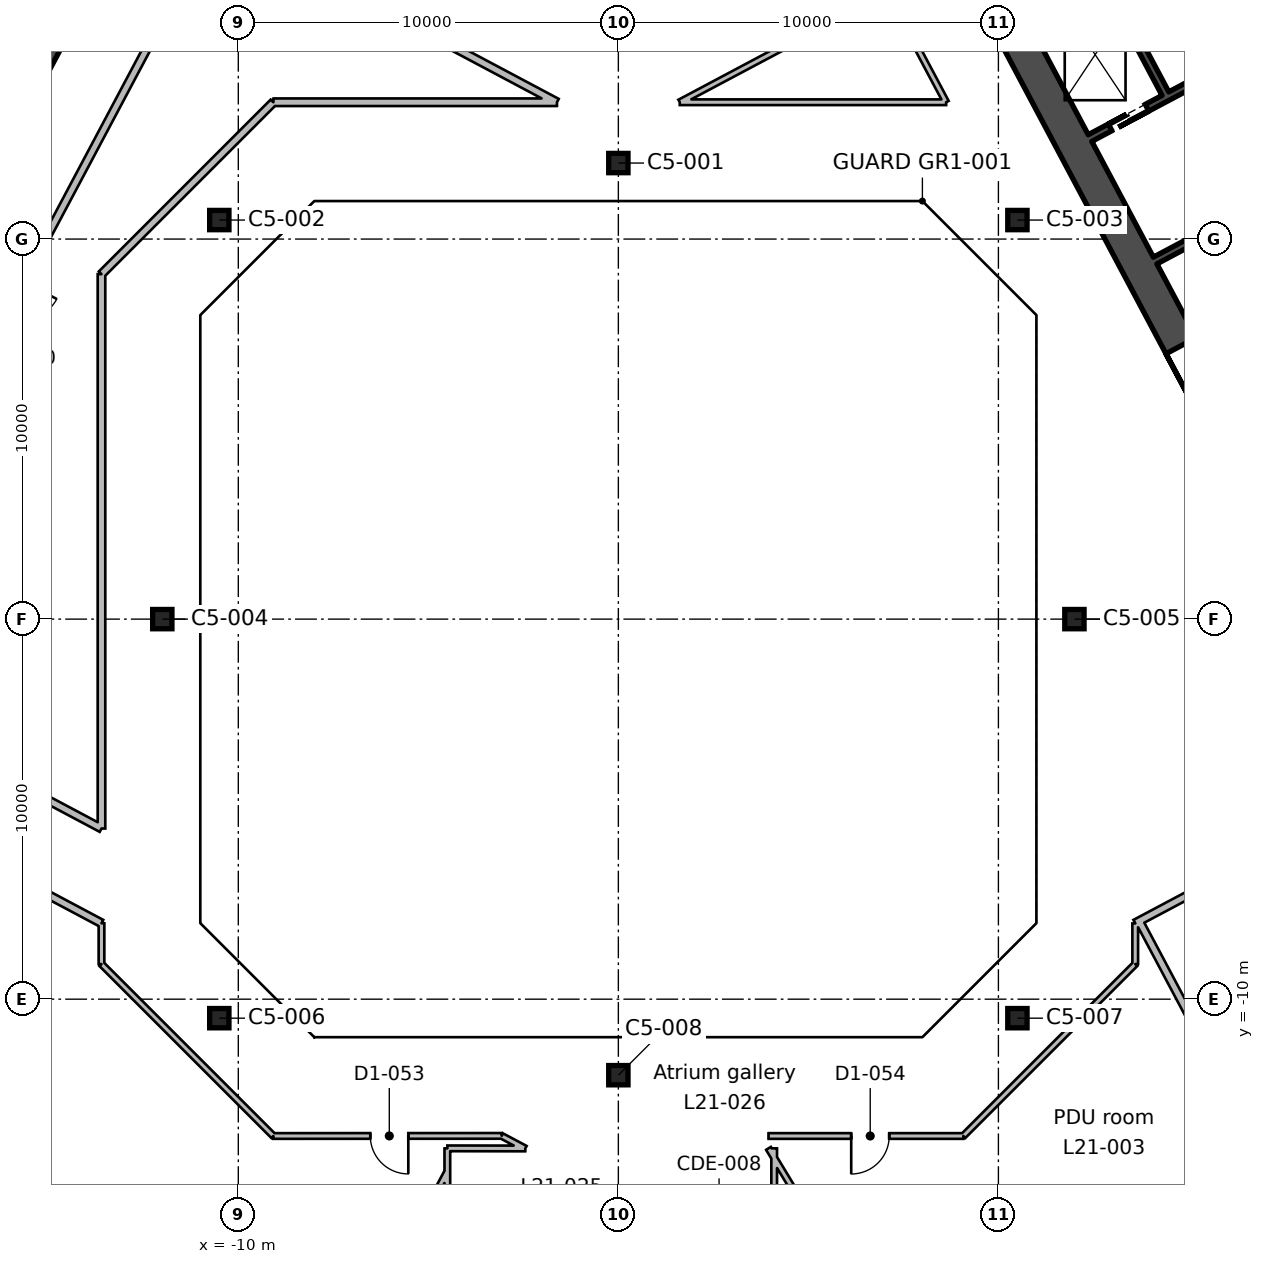
"""IFC4 building model, lengths in metres.
Left out: names, types, materials, properties, quantities, classifications, styles, units other than length and angle.
Written with IfcOpenShell. Run it as: python <this file> out.ifc"""

import sys

from ifc_helpers import new_model, si_unit, direction, frame, frame_2d, origin, origin_2d, place, context, subcontext, project, spatial, rectangle, hollow_rectangle, extrude, element, fill, save


model = new_model("IFC4")
c1 = context("Model", 3, precision=1e-05, world=origin(), true_north=direction((0.0, 1.0)))
c2 = subcontext(c1, "Body", "Model", "MODEL_VIEW")
j1 = project(units=[si_unit("LENGTHUNIT", "METRE"), si_unit("PLANEANGLEUNIT", "RADIAN")], contexts=[c1])
p1 = place(None, origin())
s1 = spatial("IfcSite", under=j1, at=p1, CompositionType="ELEMENT")
p2 = place(p1, origin())
s2 = spatial("IfcBuilding", under=s1, at=p2, CompositionType="ELEMENT")
p3 = place(p2, frame((0.0, 0.0, 107.6)))
s3 = spatial("IfcBuildingStorey", under=s2, at=p3, CompositionType="ELEMENT", Elevation=107.6)
for number, where, z_axis, x_axis in (
    (1, (0.0, -12.0, 0.0), (0.0, 0.0, 1.0), (1.0, 0.0, 0.0)),
    (2, (-10.5, -10.5, 0.0), (0.0, 0.0, 1.0), (1.0, 0.0, 0.0)),
    (3, (10.5, -10.5, 0.0), (0.0, 0.0, 1.0), (1.0, 0.0, 0.0)),
    (4, (-12.0, 0.0, 0.0), (0.0, 0.0, 1.0), (1.0, 0.0, 0.0)),
    (5, (12.0, 0.0, 0.0), (0.0, 0.0, 1.0), (1.0, 0.0, 0.0)),
    (6, (-10.5, 10.5, 0.0), (0.0, 0.0, 1.0), (1.0, 0.0, 0.0)),
    (7, (10.5, 10.5, 0.0), (0.0, 0.0, 1.0), (1.0, 0.0, 0.0)),
    (8, (0.0, 12.0, 0.0), (0.0, 0.0, 1.0), (1.0, 0.0, 0.0)),
):
    element("IfcColumn", number, at=place(p3, frame(where, z_axis=z_axis, x_axis=x_axis)), inside=s3, PredefinedType="COLUMN", context=c2, shape_type="SweptSolid", body=[
        extrude(hollow_rectangle(XDim=0.508, YDim=0.508, WallThickness=0.021, InnerFilletRadius=0.01, OuterFilletRadius=0.031, at=origin_2d()), origin(), (0.0, 0.0, 1.0), 4.6),
    ])
p4 = place(p3, frame((-13.362, 18.43, 0.0), z_axis=(0.0, 0.0, 1.0), x_axis=(-0.46947084998, -0.882947971864, 0.0)))
e9 = element("IfcWall", 9, at=p4, inside=s3, PredefinedType="SHEAR", context=c2, shape_type="SweptSolid", body=[
    extrude(rectangle(XDim=20.0, YDim=0.9, at=frame_2d((10.0, 0.0))), origin(), (0.0, 0.0, 1.0), 4.6),
])
p5 = place(p4, frame((7.0, 0.0, 0.0)))
e10 = element("IfcOpeningElement", 10, at=p5, cuts=e9, PredefinedType="OPENING", context=c2, shape_type="SweptSolid", body=[
    extrude(rectangle(XDim=2.4, YDim=2.4, at=frame_2d((1.2, 1.2))), frame((0.0, 0.46, 0.0), z_axis=(0.0, -1.0, 0.0), x_axis=(1.0, 0.0, 0.0)), (0.0, 0.0, 1.0), 0.92),
])
p6 = place(p3, frame((19.219, -1.107, 0.0), z_axis=(0.0, 0.0, 1.0), x_axis=(-0.46947084998, 0.882947971864, 0.0)))
e11 = element("IfcWall", 11, at=p6, inside=s3, PredefinedType="SHEAR", context=c2, shape_type="SweptSolid", body=[
    extrude(rectangle(XDim=20.0, YDim=0.9, at=frame_2d((10.0, 0.0))), origin(), (0.0, 0.0, 1.0), 4.6),
])
p7 = place(p6, frame((7.0, 0.0, 0.0)))
e12 = element("IfcOpeningElement", 12, at=p7, cuts=e11, PredefinedType="OPENING", context=c2, shape_type="SweptSolid", body=[
    extrude(rectangle(XDim=2.4, YDim=2.4, at=frame_2d((1.2, 1.2))), frame((0.0, 0.46, 0.0), z_axis=(0.0, -1.0, 0.0), x_axis=(1.0, 0.0, 0.0)), (0.0, 0.0, 1.0), 0.92),
])
p8 = place(p3, frame((14.394, 13.826, 0.0), z_axis=(0.0, 0.0, 1.0), x_axis=(-0.469494272526, 0.882935517501, 0.0)))
e13 = element("IfcWall", 13, at=p8, inside=s3, PredefinedType="SHEAR", context=c2, shape_type="SweptSolid", body=[
    extrude(rectangle(XDim=3.65, YDim=0.2, at=frame_2d((1.825, 0.0))), origin(), (0.0, 0.0, 1.0), 4.6),
])
p9 = place(p3, frame((18.138, 11.683, 0.0), z_axis=(0.0, 0.0, 1.0), x_axis=(-0.469480409012, 0.88294288918, 0.0)))
e14 = element("IfcWall", 14, at=p9, inside=s3, PredefinedType="SHEAR", context=c2, shape_type="SweptSolid", body=[
    extrude(rectangle(XDim=7.3, YDim=0.2, at=frame_2d((3.65, 0.0))), origin(), (0.0, 0.0, 1.0), 4.6),
])
p10 = place(p3, frame((14.124, 9.435, 0.0), z_axis=(0.0, 0.0, 1.0), x_axis=(0.882940221191, 0.469485426614, 0.0)))
e15 = element("IfcWall", 15, at=p10, inside=s3, PredefinedType="SHEAR", context=c2, shape_type="SweptSolid", body=[
    extrude(rectangle(XDim=10.0, YDim=0.2, at=frame_2d((5.0, 0.0))), origin(), (0.0, 0.0, 1.0), 4.6),
])
p11 = place(p10, frame((2.1, 0.0, 0.0)))
e16 = element("IfcOpeningElement", 16, at=p11, cuts=e15, PredefinedType="OPENING", context=c2, shape_type="SweptSolid", body=[
    extrude(rectangle(XDim=1.2, YDim=2.1, at=frame_2d((0.6, 1.05))), frame((0.0, 0.11, 0.0), z_axis=(0.0, -1.0, 0.0), x_axis=(1.0, 0.0, 0.0)), (0.0, 0.0, 1.0), 0.22),
])
p12 = place(p10, frame((5.4, 0.0, 0.0)))
e17 = element("IfcOpeningElement", 17, at=p12, cuts=e15, PredefinedType="OPENING", context=c2, shape_type="SweptSolid", body=[
    extrude(rectangle(XDim=1.1, YDim=2.1, at=frame_2d((0.55, 1.05))), frame((0.0, 0.11, 0.0), z_axis=(0.0, -1.0, 0.0), x_axis=(1.0, 0.0, 0.0)), (0.0, 0.0, 1.0), 0.22),
])
p13 = place(p10, frame((8.1, 0.0, 0.0)))
e18 = element("IfcOpeningElement", 18, at=p13, cuts=e15, PredefinedType="OPENING", context=c2, shape_type="SweptSolid", body=[
    extrude(rectangle(XDim=1.1, YDim=2.1, at=frame_2d((0.55, 1.05))), frame((0.0, 0.11, 0.0), z_axis=(0.0, -1.0, 0.0), x_axis=(1.0, 0.0, 0.0)), (0.0, 0.0, 1.0), 0.22),
])
p14 = place(p3, frame((12.41, 12.658, 0.0), z_axis=(0.0, 0.0, 1.0), x_axis=(0.8829484765, 0.469469900894, 0.0)))
e19 = element("IfcWall", 19, at=p14, inside=s3, PredefinedType="SHEAR", context=c2, shape_type="SweptSolid", body=[
    extrude(rectangle(XDim=4.5, YDim=0.2, at=frame_2d((2.25, 0.0))), origin(), (0.0, 0.0, 1.0), 4.6),
])
p15 = place(p14, frame((0.6, 0.0, 0.0)))
e20 = element("IfcOpeningElement", 20, at=p15, cuts=e19, PredefinedType="OPENING", context=c2, shape_type="SweptSolid", body=[
    extrude(rectangle(XDim=1.1, YDim=2.1, at=frame_2d((0.55, 1.05))), frame((0.0, 0.11, 0.0), z_axis=(0.0, -1.0, 0.0), x_axis=(1.0, 0.0, 0.0)), (0.0, 0.0, 1.0), 0.22),
])
p16 = place(p3, frame((-13.6, -9.077, 0.0), z_axis=(0.0, 0.0, 1.0), x_axis=(0.0, 1.0, 0.0)))
e21 = element("IfcWall", 21, at=p16, inside=s3, PredefinedType="PARTITIONING", context=c2, shape_type="SweptSolid", body=[
    extrude(rectangle(XDim=1.075, YDim=0.15, at=frame_2d((0.538, 0.0))), origin(), (0.0, 0.0, 1.0), 4.15),
])
p17 = place(p3, frame((-13.6, -8.002, 0.0), z_axis=(0.0, 0.0, 1.0), x_axis=(-0.882949686262, 0.469467625646, 0.0)))
e22 = element("IfcWall", 22, at=p17, inside=s3, PredefinedType="PARTITIONING", context=c2, shape_type="SweptSolid", body=[
    extrude(rectangle(XDim=34.795, YDim=0.2, at=frame_2d((17.397, 0.0))), origin(), (0.0, 0.0, 1.0), 4.15),
])
p18 = place(p17, frame((26.25, 0.0, 0.0)))
e23 = element("IfcOpeningElement", 23, at=p18, cuts=e22, PredefinedType="OPENING", context=c2, shape_type="SweptSolid", body=[
    extrude(rectangle(XDim=1.0, YDim=2.1, at=frame_2d((0.5, 1.05))), frame((0.0, 0.11, 0.0), z_axis=(0.0, -1.0, 0.0), x_axis=(1.0, 0.0, 0.0)), (0.0, 0.0, 1.0), 0.22),
])
p19 = place(p17, frame((16.85, 0.0, 0.0)))
e24 = element("IfcOpeningElement", 24, at=p19, cuts=e22, PredefinedType="OPENING", context=c2, shape_type="SweptSolid", body=[
    extrude(rectangle(XDim=1.0, YDim=2.1, at=frame_2d((0.5, 1.05))), frame((0.0, 0.11, 0.0), z_axis=(0.0, -1.0, 0.0), x_axis=(1.0, 0.0, 0.0)), (0.0, 0.0, 1.0), 0.22),
])
p20 = place(p3, frame((-13.6, -9.077, 0.0), z_axis=(0.0, 0.0, 1.0), x_axis=(0.707106781187, -0.707106781187, 0.0)))
e25 = element("IfcWall", 25, at=p20, inside=s3, PredefinedType="PARTITIONING", context=c2, shape_type="SweptSolid", body=[
    extrude(rectangle(XDim=6.397, YDim=0.15, at=frame_2d((3.198, 0.0))), origin(), (0.0, 0.0, 1.0), 4.15),
])
p21 = place(p3, frame((-9.077, -13.6, 0.0), z_axis=(0.0, 0.0, 1.0), x_axis=(0.999999860368, 0.000528455211, 0.0)))
e26 = element("IfcWall", 26, at=p21, inside=s3, PredefinedType="PARTITIONING", context=c2, shape_type="SweptSolid", body=[
    extrude(rectangle(XDim=6.006, YDim=0.15, at=frame_2d((3.003, 0.0))), origin(), (0.0, 0.0, 1.0), 4.15),
])
p22 = place(p21, frame((2.55, 0.0, 0.0)))
e27 = element("IfcOpeningElement", 27, at=p22, cuts=e26, PredefinedType="OPENING", context=c2, shape_type="SweptSolid", body=[
    extrude(rectangle(XDim=1.0, YDim=2.1, at=frame_2d((0.5, 1.05))), frame((0.0, 0.085, 0.0), z_axis=(0.0, -1.0, 0.0), x_axis=(1.0, 0.0, 0.0)), (0.0, 0.0, 1.0), 0.17),
])
p23 = place(p3, frame((-3.071, -13.597, 0.0), z_axis=(0.0, 0.0, 1.0), x_axis=(0.883079874776, -0.469222692083, 0.0)))
e28 = element("IfcWall", 28, at=p23, inside=s3, PredefinedType="PARTITIONING", context=c2, shape_type="SweptSolid", body=[
    extrude(rectangle(XDim=0.706, YDim=0.15, at=frame_2d((0.353, 0.0))), origin(), (0.0, 0.0, 1.0), 4.15),
])
p24 = place(p3, frame((-2.448, -13.928, 0.0), z_axis=(0.0, 0.0, 1.0), x_axis=(-0.999998980807, 0.001427720139, 0.0)))
e29 = element("IfcWall", 29, at=p24, inside=s3, PredefinedType="PARTITIONING", context=c2, shape_type="SweptSolid", body=[
    extrude(rectangle(XDim=2.052, YDim=0.15, at=frame_2d((1.026, 0.0))), origin(), (0.0, 0.0, 1.0), 4.15),
])
p25 = place(p3, frame((-4.5, -13.925, 0.0), z_axis=(0.0, 0.0, 1.0), x_axis=(0.0, -1.0, 0.0)))
e30 = element("IfcWall", 30, at=p25, inside=s3, PredefinedType="PARTITIONING", context=c2, shape_type="SweptSolid", body=[
    extrude(rectangle(XDim=2.05, YDim=0.15, at=frame_2d((1.025, 0.0))), origin(), (0.0, 0.0, 1.0), 4.15),
])
p26 = place(p3, frame((-4.5, -14.533, 0.0), z_axis=(0.0, 0.0, 1.0), x_axis=(-0.469522352041, -0.882920585859, 0.0)))
e31 = element("IfcWall", 31, at=p26, inside=s3, PredefinedType="PARTITIONING", context=c2, shape_type="SweptSolid", body=[
    extrude(rectangle(XDim=6.255, YDim=0.15, at=frame_2d((3.128, 0.0))), origin(), (0.0, 0.0, 1.0), 4.15),
])
p27 = place(p3, frame((4.1, -13.925, 0.0), z_axis=(0.0, 0.0, 1.0), x_axis=(0.0, -1.0, 0.0)))
e32 = element("IfcWall", 32, at=p27, inside=s3, PredefinedType="PARTITIONING", context=c2, shape_type="SweptSolid", body=[
    extrude(rectangle(XDim=2.05, YDim=0.15, at=frame_2d((1.025, 0.0))), origin(), (0.0, 0.0, 1.0), 4.15),
])
p28 = place(p3, frame((13.6, -8.007, 0.0), z_axis=(0.0, 0.0, 1.0), x_axis=(0.0, -1.0, 0.0)))
e33 = element("IfcWall", 33, at=p28, inside=s3, PredefinedType="PARTITIONING", context=c2, shape_type="SweptSolid", body=[
    extrude(rectangle(XDim=1.07, YDim=0.15, at=frame_2d((0.535, 0.0))), origin(), (0.0, 0.0, 1.0), 4.15),
])
p29 = place(p3, frame((13.6, -9.077, 0.0), z_axis=(0.0, 0.0, 1.0), x_axis=(-0.707106781187, -0.707106781187, 0.0)))
e34 = element("IfcWall", 34, at=p29, inside=s3, PredefinedType="PARTITIONING", context=c2, shape_type="SweptSolid", body=[
    extrude(rectangle(XDim=6.397, YDim=0.15, at=frame_2d((3.198, 0.0))), origin(), (0.0, 0.0, 1.0), 4.15),
])
p30 = place(p3, frame((9.077, -13.6, 0.0), z_axis=(0.0, 0.0, 1.0), x_axis=(-1.0, 0.0, 0.0)))
e35 = element("IfcWall", 35, at=p30, inside=s3, PredefinedType="PARTITIONING", context=c2, shape_type="SweptSolid", body=[
    extrude(rectangle(XDim=5.127, YDim=0.15, at=frame_2d((2.563, 0.0))), origin(), (0.0, 0.0, 1.0), 4.15),
])
p31 = place(p30, frame((1.95, 0.0, 0.0)))
e36 = element("IfcOpeningElement", 36, at=p31, cuts=e35, PredefinedType="OPENING", context=c2, shape_type="SweptSolid", body=[
    extrude(rectangle(XDim=1.0, YDim=2.1, at=frame_2d((0.5, 1.05))), frame((0.0, 0.085, 0.0), z_axis=(0.0, -1.0, 0.0), x_axis=(1.0, 0.0, 0.0)), (0.0, 0.0, 1.0), 0.17),
])
p32 = place(p3, frame((7.609, -19.965, 0.0), z_axis=(0.0, 0.0, 1.0), x_axis=(-0.518126246201, 0.855304152333, 0.0)))
e37 = element("IfcWall", 37, at=p32, inside=s3, PredefinedType="PARTITIONING", context=c2, shape_type="SweptSolid", body=[
    extrude(rectangle(XDim=7.062, YDim=0.15, at=frame_2d((3.531, 0.0))), origin(), (0.0, 0.0, 1.0), 4.15),
])
p33 = place(p3, frame((13.704, -7.946, 0.0), z_axis=(0.0, 0.0, 1.0), x_axis=(0.469513711464, -0.882925180719, 0.0)))
e38 = element("IfcWall", 38, at=p33, inside=s3, PredefinedType="PARTITIONING", context=c2, shape_type="SweptSolid", body=[
    extrude(rectangle(XDim=7.75, YDim=0.2, at=frame_2d((3.875, 0.0))), origin(), (0.0, 0.0, 1.0), 4.15),
])
p34 = place(p3, frame((62.372, 17.93, 0.0), z_axis=(0.0, 0.0, 1.0), x_axis=(-0.88295234377, -0.469462627513, 0.0)))
e39 = element("IfcWall", 39, at=p34, inside=s3, PredefinedType="PARTITIONING", context=c2, shape_type="SweptSolid", body=[
    extrude(rectangle(XDim=55.237, YDim=0.2, at=frame_2d((27.619, 0.0))), origin(), (0.0, 0.0, 1.0), 4.15),
])
p35 = place(p34, frame((38.75, 0.0, 0.0)))
e40 = element("IfcOpeningElement", 40, at=p35, cuts=e39, PredefinedType="OPENING", context=c2, shape_type="SweptSolid", body=[
    extrude(rectangle(XDim=1.0, YDim=2.1, at=frame_2d((0.5, 1.05))), frame((0.0, 0.11, 0.0), z_axis=(0.0, -1.0, 0.0), x_axis=(1.0, 0.0, 0.0)), (0.0, 0.0, 1.0), 0.22),
])
p36 = place(p34, frame((27.15, 0.0, 0.0)))
e41 = element("IfcOpeningElement", 41, at=p36, cuts=e39, PredefinedType="OPENING", context=c2, shape_type="SweptSolid", body=[
    extrude(rectangle(XDim=1.0, YDim=2.1, at=frame_2d((0.5, 1.05))), frame((0.0, 0.11, 0.0), z_axis=(0.0, -1.0, 0.0), x_axis=(1.0, 0.0, 0.0)), (0.0, 0.0, 1.0), 0.22),
])
p37 = place(p34, frame((20.85, 0.0, 0.0)))
e42 = element("IfcOpeningElement", 42, at=p37, cuts=e39, PredefinedType="OPENING", context=c2, shape_type="SweptSolid", body=[
    extrude(rectangle(XDim=1.0, YDim=2.1, at=frame_2d((0.5, 1.05))), frame((0.0, 0.11, 0.0), z_axis=(0.0, -1.0, 0.0), x_axis=(1.0, 0.0, 0.0)), (0.0, 0.0, 1.0), 0.22),
])
p38 = place(p3, frame((-21.175, -1.483, 0.0), z_axis=(0.0, 0.0, 1.0), x_axis=(0.469455871296, 0.882955935993, 0.0)))
e43 = element("IfcWall", 43, at=p38, inside=s3, PredefinedType="PARTITIONING", context=c2, shape_type="SweptSolid", body=[
    extrude(rectangle(XDim=22.5, YDim=0.2, at=frame_2d((11.25, 0.0))), origin(), (0.0, 0.0, 1.0), 4.15),
])
p39 = place(p38, frame((10.75, 0.0, 0.0)))
e44 = element("IfcOpeningElement", 44, at=p39, cuts=e43, PredefinedType="OPENING", context=c2, shape_type="SweptSolid", body=[
    extrude(rectangle(XDim=1.0, YDim=2.1, at=frame_2d((0.5, 1.05))), frame((0.0, 0.11, 0.0), z_axis=(0.0, -1.0, 0.0), x_axis=(1.0, 0.0, 0.0)), (0.0, 0.0, 1.0), 0.22),
])
p40 = place(p3, frame((-10.612, 18.384, 0.0), z_axis=(0.0, 0.0, 1.0), x_axis=(0.882943182981, -0.469479856467, 0.0)))
e45 = element("IfcWall", 45, at=p40, inside=s3, PredefinedType="PARTITIONING", context=c2, shape_type="SweptSolid", body=[
    extrude(rectangle(XDim=10.19, YDim=0.2, at=frame_2d((5.095, 0.0))), origin(), (0.0, 0.0, 1.0), 4.15),
])
p41 = place(p3, frame((-1.615, 13.6, 0.0), z_axis=(0.0, 0.0, 1.0), x_axis=(-1.0, 0.0, 0.0)))
e46 = element("IfcWall", 46, at=p41, inside=s3, PredefinedType="PARTITIONING", context=c2, shape_type="SweptSolid", body=[
    extrude(rectangle(XDim=7.462, YDim=0.2, at=frame_2d((3.731, 0.0))), origin(), (0.0, 0.0, 1.0), 4.15),
])
p42 = place(p3, frame((-9.077, 13.6, 0.0), z_axis=(0.0, 0.0, 1.0), x_axis=(-0.707106781187, -0.707106781187, 0.0)))
e47 = element("IfcWall", 47, at=p42, inside=s3, PredefinedType="PARTITIONING", context=c2, shape_type="SweptSolid", body=[
    extrude(rectangle(XDim=6.397, YDim=0.2, at=frame_2d((3.198, 0.0))), origin(), (0.0, 0.0, 1.0), 4.15),
])
p43 = place(p3, frame((-13.6, 9.077, 0.0), z_axis=(0.0, 0.0, 1.0), x_axis=(0.0, -1.0, 0.0)))
e48 = element("IfcWall", 48, at=p43, inside=s3, PredefinedType="PARTITIONING", context=c2, shape_type="SweptSolid", body=[
    extrude(rectangle(XDim=14.587, YDim=0.2, at=frame_2d((7.293, 0.0))), origin(), (0.0, 0.0, 1.0), 4.15),
])
p44 = place(p3, frame((-13.6, -5.51, 0.0), z_axis=(0.0, 0.0, 1.0), x_axis=(-0.882975295816, 0.469419457392, 0.0)))
e49 = element("IfcWall", 49, at=p44, inside=s3, PredefinedType="PARTITIONING", context=c2, shape_type="SweptSolid", body=[
    extrude(rectangle(XDim=8.579, YDim=0.2, at=frame_2d((4.29, 0.0))), origin(), (0.0, 0.0, 1.0), 4.15),
])
p45 = place(p3, frame((1.615, 13.6, 0.0), z_axis=(0.0, 0.0, 1.0), x_axis=(1.0, 0.0, 0.0)))
e50 = element("IfcWall", 50, at=p45, inside=s3, PredefinedType="PARTITIONING", context=c2, shape_type="SweptSolid", body=[
    extrude(rectangle(XDim=7.01, YDim=0.15, at=frame_2d((3.505, 0.0))), origin(), (0.0, 0.0, 1.0), 4.15),
])
p46 = place(p3, frame((8.625, 13.6, 0.0), z_axis=(0.0, 0.0, 1.0), x_axis=(-0.469417352915, 0.882976414624, 0.0)))
e51 = element("IfcWall", 51, at=p46, inside=s3, PredefinedType="PARTITIONING", context=c2, shape_type="SweptSolid", body=[
    extrude(rectangle(XDim=3.291, YDim=0.15, at=frame_2d((1.646, 0.0))), origin(), (0.0, 0.0, 1.0), 4.15),
])
p47 = place(p3, frame((7.08, 16.506, 0.0), z_axis=(0.0, 0.0, 1.0), x_axis=(-0.882936403153, -0.469492606957, 0.0)))
e52 = element("IfcWall", 52, at=p47, inside=s3, PredefinedType="PARTITIONING", context=c2, shape_type="SweptSolid", body=[
    extrude(rectangle(XDim=6.19, YDim=0.15, at=frame_2d((3.095, 0.0))), origin(), (0.0, 0.0, 1.0), 4.15),
])
p48 = place(p7, frame((2.4, 0.0, 0.0), z_axis=(0.0, 0.0, 1.0), x_axis=(-1.0, 0.0, 0.0)))
e53 = element("IfcDoor", 53, at=p48, inside=s3, OperationType="DOUBLE_DOOR_SINGLE_SWING", PredefinedType="DOOR", context=c2, shape_type="SweptSolid", body=[
    extrude(rectangle(XDim=2.4, YDim=2.4, at=frame_2d((1.2, 1.2))), frame((0.0, 0.025, 0.0), z_axis=(0.0, -1.0, 0.0), x_axis=(1.0, 0.0, 0.0)), (0.0, 0.0, 1.0), 0.05),
])
fill(e12, e53)
p49 = place(p15, origin())
e54 = element("IfcDoor", 54, at=p49, inside=s3, OperationType="DOUBLE_DOOR_SLIDING", PredefinedType="DOOR", context=c2, shape_type="SweptSolid", body=[
    extrude(rectangle(XDim=1.1, YDim=2.1, at=frame_2d((0.55, 1.05))), frame((0.0, 0.025, 0.0), z_axis=(0.0, -1.0, 0.0), x_axis=(1.0, 0.0, 0.0)), (0.0, 0.0, 1.0), 0.05),
])
fill(e20, e54)
p50 = place(p31, origin())
e55 = element("IfcDoor", 55, at=p50, inside=s3, OperationType="SINGLE_SWING_RIGHT", PredefinedType="DOOR", context=c2, shape_type="SweptSolid", body=[
    extrude(rectangle(XDim=1.0, YDim=2.1, at=frame_2d((0.5, 1.05))), frame((0.0, 0.025, 0.0), z_axis=(0.0, -1.0, 0.0), x_axis=(1.0, 0.0, 0.0)), (0.0, 0.0, 1.0), 0.05),
])
fill(e36, e55)
p51 = place(p22, frame((1.0, 0.0, 0.0), z_axis=(0.0, 0.0, 1.0), x_axis=(-1.0, 0.0, 0.0)))
e56 = element("IfcDoor", 56, at=p51, inside=s3, OperationType="SINGLE_SWING_LEFT", PredefinedType="DOOR", context=c2, shape_type="SweptSolid", body=[
    extrude(rectangle(XDim=1.0, YDim=2.1, at=frame_2d((0.5, 1.05))), frame((0.0, 0.025, 0.0), z_axis=(0.0, -1.0, 0.0), x_axis=(1.0, 0.0, 0.0)), (0.0, 0.0, 1.0), 0.05),
])
fill(e27, e56)
save(model, sys.argv[1])
